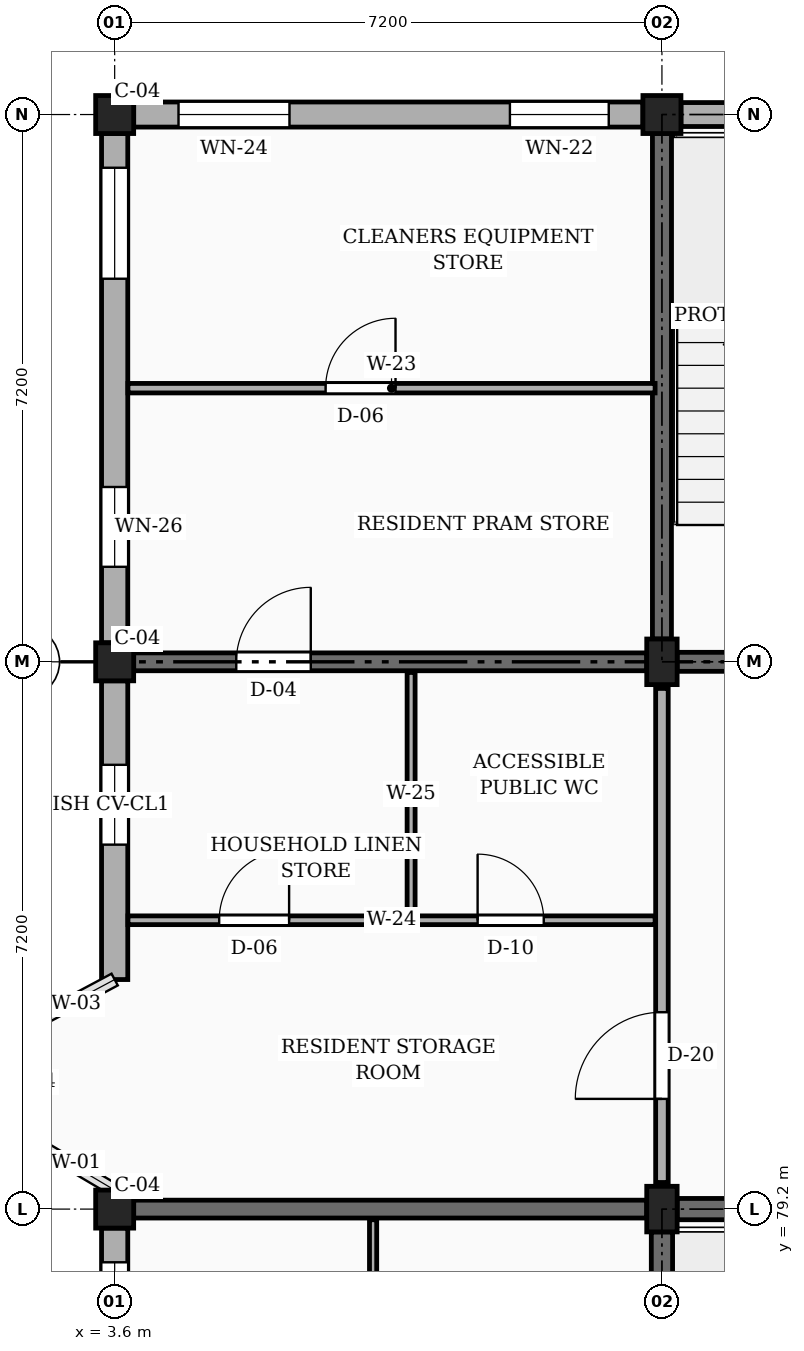
"""IFC4 building model, lengths in metres.
Left out: names, types, materials, properties, quantities, classifications, styles, units other than length and angle.
Written with IfcOpenShell. Run it as: python <this file> out.ifc"""

import sys

from ifc_helpers import new_model, si_unit, direction, frame, frame_2d, origin, origin_2d, place, context, subcontext, project, spatial, rectangle, extrude, element, fill, save


model = new_model("IFC4")
c1 = context("Model", 3, precision=1e-05, world=origin(), true_north=direction((0.0, 1.0)))
c2 = subcontext(c1, "Body", "Model", "MODEL_VIEW")
j1 = project(units=[si_unit("LENGTHUNIT", "METRE"), si_unit("PLANEANGLEUNIT", "RADIAN")], contexts=[c1])
p1 = place(None, origin())
s1 = spatial("IfcSite", under=j1, at=p1, CompositionType="ELEMENT")
p2 = place(p1, origin())
s2 = spatial("IfcBuilding", under=s1, at=p2, CompositionType="ELEMENT")
p3 = place(p2, frame((0.0, 0.0, 23.4)))
s3 = spatial("IfcBuildingStorey", under=s2, at=p3, CompositionType="ELEMENT", Elevation=23.4)
for number, where, z_axis, x_axis in (
    (1, (3.6, 79.2, 0.0), (0.0, 0.0, 1.0), (1.0, 0.0, 0.0)),
    (2, (3.6, 86.4, 0.0), (0.0, 0.0, 1.0), (1.0, 0.0, 0.0)),
    (3, (3.6, 93.6, 0.0), (0.0, 0.0, 1.0), (1.0, 0.0, 0.0)),
):
    element("IfcColumn", number, at=place(p3, frame(where, z_axis=z_axis, x_axis=x_axis)), inside=s3, PredefinedType="COLUMN", context=c2, shape_type="SweptSolid", body=[
        extrude(rectangle(XDim=0.5, YDim=0.5, at=origin_2d()), origin(), (0.0, 0.0, 1.0), 3.15),
    ])
for number, where, z_axis, x_axis in (
    (4, (10.8, 79.2, 0.0), (0.0, 0.0, 1.0), (1.0, 0.0, 0.0)),
    (5, (10.8, 86.4, 0.0), (0.0, 0.0, 1.0), (1.0, 0.0, 0.0)),
):
    element("IfcColumn", number, at=place(p3, frame(where, z_axis=z_axis, x_axis=x_axis)), inside=s3, PredefinedType="COLUMN", context=c2, shape_type="SweptSolid", body=[
        extrude(rectangle(XDim=0.4, YDim=0.6, at=origin_2d()), origin(), (0.0, 0.0, 1.0), 3.15),
    ])
p4 = place(p3, frame((10.8, 93.6, 0.0), z_axis=(0.0, 0.0, 1.0), x_axis=(1.0, 0.0, 0.0)))
e6 = element("IfcColumn", 6, at=p4, inside=s3, PredefinedType="COLUMN", context=c2, shape_type="SweptSolid", body=[
    extrude(rectangle(XDim=0.5, YDim=0.5, at=origin_2d()), origin(), (0.0, 0.0, 1.0), 3.15),
])
p5 = place(p3, frame((3.85, 79.2, 0.0), z_axis=(0.0, 0.0, 1.0), x_axis=(1.0, 0.0, 0.0)))
e7 = element("IfcWall", 7, at=p5, inside=s3, PredefinedType="SOLIDWALL", context=c2, shape_type="SweptSolid", body=[
    extrude(rectangle(XDim=6.75, YDim=0.235, at=frame_2d((3.375, 0.0))), origin(), (0.0, 0.0, 1.0), 2.21),
])
p6 = place(p3, frame((3.85, 86.4, 0.0), z_axis=(0.0, 0.0, 1.0), x_axis=(1.0, 0.0, 0.0)))
e8 = element("IfcWall", 8, at=p6, inside=s3, PredefinedType="SOLIDWALL", context=c2, shape_type="SweptSolid", body=[
    extrude(rectangle(XDim=6.75, YDim=0.235, at=frame_2d((3.375, 0.0))), origin(), (0.0, 0.0, 1.0), 2.21),
])
p7 = place(p6, frame((1.35, 0.0, 0.0)))
e9 = element("IfcOpeningElement", 9, at=p7, cuts=e8, PredefinedType="OPENING", context=c2, shape_type="SweptSolid", body=[
    extrude(rectangle(XDim=0.98, YDim=2.12, at=frame_2d((0.49, 1.06))), frame((0.0, 0.127, 0.0), z_axis=(0.0, -1.0, 0.0), x_axis=(1.0, 0.0, 0.0)), (0.0, 0.0, 1.0), 0.255),
])
p8 = place(p3, frame((17.75, 93.6, 0.0), z_axis=(0.0, 0.0, 1.0), x_axis=(-1.0, 0.0, 0.0)))
e10 = element("IfcWall", 10, at=p8, inside=s3, PredefinedType="SOLIDWALL", context=c2, shape_type="SweptSolid", body=[
    extrude(rectangle(XDim=6.7, YDim=0.315, at=frame_2d((3.35, 0.0))), origin(), (0.0, 0.0, 1.0), 2.48),
])
p9 = place(p8, frame((2.925, 0.0, 0.9)))
e11 = element("IfcOpeningElement", 11, at=p9, cuts=e10, PredefinedType="OPENING", context=c2, shape_type="SweptSolid", body=[
    extrude(rectangle(XDim=0.85, YDim=1.15, at=frame_2d((0.425, 0.575))), frame((0.0, 0.167, 0.0), z_axis=(0.0, -1.0, 0.0), x_axis=(1.0, 0.0, 0.0)), (0.0, 0.0, 1.0), 0.335),
])
p10 = place(p3, frame((10.55, 93.6, 0.0), z_axis=(0.0, 0.0, 1.0), x_axis=(-1.0, 0.0, 0.0)))
e12 = element("IfcWall", 12, at=p10, inside=s3, PredefinedType="SOLIDWALL", context=c2, shape_type="SweptSolid", body=[
    extrude(rectangle(XDim=6.7, YDim=0.33, at=frame_2d((3.35, 0.0))), origin(), (0.0, 0.0, 1.0), 2.48),
])
p11 = place(p10, frame((0.45, 0.0, 0.78)))
e13 = element("IfcOpeningElement", 13, at=p11, cuts=e12, PredefinedType="OPENING", context=c2, shape_type="SweptSolid", body=[
    extrude(rectangle(XDim=1.3, YDim=1.36, at=frame_2d((0.65, 0.68))), frame((0.0, 0.175, 0.0), z_axis=(0.0, -1.0, 0.0), x_axis=(1.0, 0.0, 0.0)), (0.0, 0.0, 1.0), 0.35),
])
p12 = place(p10, frame((4.65, 0.0, 0.78)))
e14 = element("IfcOpeningElement", 14, at=p12, cuts=e12, PredefinedType="OPENING", context=c2, shape_type="SweptSolid", body=[
    extrude(rectangle(XDim=1.46, YDim=1.36, at=frame_2d((0.73, 0.68))), frame((0.0, 0.175, 0.0), z_axis=(0.0, -1.0, 0.0), x_axis=(1.0, 0.0, 0.0)), (0.0, 0.0, 1.0), 0.35),
])
p13 = place(p3, frame((3.6, 93.35, 0.0), z_axis=(0.0, 0.0, 1.0), x_axis=(0.0, -1.0, 0.0)))
e15 = element("IfcWall", 15, at=p13, inside=s3, PredefinedType="SOLIDWALL", context=c2, shape_type="SweptSolid", body=[
    extrude(rectangle(XDim=6.7, YDim=0.345, at=frame_2d((3.35, 0.0))), origin(), (0.0, 0.0, 1.0), 2.48),
])
p14 = place(p13, frame((0.45, 0.0, 0.78)))
e16 = element("IfcOpeningElement", 16, at=p14, cuts=e15, PredefinedType="OPENING", context=c2, shape_type="SweptSolid", body=[
    extrude(rectangle(XDim=1.46, YDim=1.36, at=frame_2d((0.73, 0.68))), frame((0.0, 0.183, 0.0), z_axis=(0.0, -1.0, 0.0), x_axis=(1.0, 0.0, 0.0)), (0.0, 0.0, 1.0), 0.365),
])
p15 = place(p13, frame((4.65, 0.0, 0.78)))
e17 = element("IfcOpeningElement", 17, at=p15, cuts=e15, PredefinedType="OPENING", context=c2, shape_type="SweptSolid", body=[
    extrude(rectangle(XDim=1.05, YDim=1.44, at=frame_2d((0.525, 0.72))), frame((0.0, 0.183, 0.0), z_axis=(0.0, -1.0, 0.0), x_axis=(1.0, 0.0, 0.0)), (0.0, 0.0, 1.0), 0.365),
])
p16 = place(p3, frame((3.6, 86.15, 0.0), z_axis=(0.0, 0.0, 1.0), x_axis=(0.0, -1.0, 0.0)))
e18 = element("IfcWall", 18, at=p16, inside=s3, PredefinedType="SOLIDWALL", context=c2, shape_type="SweptSolid", body=[
    extrude(rectangle(XDim=3.93, YDim=0.345, at=frame_2d((1.965, 0.0))), origin(), (0.0, 0.0, 1.0), 2.48),
])
p17 = place(p16, frame((1.105, 0.0, 0.78)))
e19 = element("IfcOpeningElement", 19, at=p17, cuts=e18, PredefinedType="OPENING", context=c2, shape_type="SweptSolid", body=[
    extrude(rectangle(XDim=1.05, YDim=1.44, at=frame_2d((0.525, 0.72))), frame((0.0, 0.183, 0.0), z_axis=(0.0, -1.0, 0.0), x_axis=(1.0, 0.0, 0.0)), (0.0, 0.0, 1.0), 0.365),
])
p18 = place(p3, frame((3.6, 78.95, 0.0), z_axis=(0.0, 0.0, 1.0), x_axis=(0.0, -1.0, 0.0)))
e20 = element("IfcWall", 20, at=p18, inside=s3, PredefinedType="SOLIDWALL", context=c2, shape_type="SweptSolid", body=[
    extrude(rectangle(XDim=6.7, YDim=0.345, at=frame_2d((3.35, 0.0))), origin(), (0.0, 0.0, 1.0), 2.48),
])
p19 = place(p18, frame((0.45, 0.0, 0.78)))
e21 = element("IfcOpeningElement", 21, at=p19, cuts=e20, PredefinedType="OPENING", context=c2, shape_type="SweptSolid", body=[
    extrude(rectangle(XDim=1.15, YDim=1.44, at=frame_2d((0.575, 0.72))), frame((0.0, 0.183, 0.0), z_axis=(0.0, -1.0, 0.0), x_axis=(1.0, 0.0, 0.0)), (0.0, 0.0, 1.0), 0.365),
])
p20 = place(p18, frame((4.65, 0.0, 0.78)))
e22 = element("IfcOpeningElement", 22, at=p20, cuts=e20, PredefinedType="OPENING", context=c2, shape_type="SweptSolid", body=[
    extrude(rectangle(XDim=1.35, YDim=1.44, at=frame_2d((0.675, 0.72))), frame((0.0, 0.183, 0.0), z_axis=(0.0, -1.0, 0.0), x_axis=(1.0, 0.0, 0.0)), (0.0, 0.0, 1.0), 0.365),
])
p21 = place(p3, frame((10.8, 72.3, 0.0), z_axis=(0.0, 0.0, 1.0), x_axis=(0.0, 1.0, 0.0)))
e23 = element("IfcWall", 23, at=p21, inside=s3, PredefinedType="SHEAR", context=c2, shape_type="SweptSolid", body=[
    extrude(rectangle(XDim=6.6, YDim=0.28, at=frame_2d((3.3, 0.0))), origin(), (0.0, 0.0, 1.0), 2.91),
])
p22 = place(p3, frame((11.0, 79.2, 0.0), z_axis=(0.0, 0.0, 1.0), x_axis=(1.0, 0.0, 0.0)))
e24 = element("IfcWall", 24, at=p22, inside=s3, PredefinedType="SHEAR", context=c2, shape_type="SweptSolid", body=[
    extrude(rectangle(XDim=6.8, YDim=0.28, at=frame_2d((3.4, 0.0))), origin(), (0.0, 0.0, 1.0), 2.91),
])
p23 = place(p3, frame((10.8, 86.7, 0.0), z_axis=(0.0, 0.0, 1.0), x_axis=(0.0, 1.0, 0.0)))
e25 = element("IfcWall", 25, at=p23, inside=s3, PredefinedType="SHEAR", context=c2, shape_type="SweptSolid", body=[
    extrude(rectangle(XDim=6.65, YDim=0.25, at=frame_2d((3.325, 0.0))), origin(), (0.0, 0.0, 1.0), 2.91),
])
p24 = place(p3, frame((11.0, 86.4, 0.0), z_axis=(0.0, 0.0, 1.0), x_axis=(1.0, 0.0, 0.0)))
e26 = element("IfcWall", 26, at=p24, inside=s3, PredefinedType="SHEAR", context=c2, shape_type="SweptSolid", body=[
    extrude(rectangle(XDim=6.8, YDim=0.25, at=frame_2d((3.4, 0.0))), origin(), (0.0, 0.0, 1.0), 2.91),
])
p25 = place(p3, frame((10.8, 79.55, 0.0), z_axis=(0.0, 0.0, 1.0), x_axis=(0.0, 1.0, 0.0)))
e27 = element("IfcWall", 27, at=p25, inside=s3, PredefinedType="PARTITIONING", context=c2, shape_type="SweptSolid", body=[
    extrude(rectangle(XDim=6.5, YDim=0.165, at=frame_2d((3.25, 0.0))), origin(), (0.0, 0.0, 1.0), 2.345),
])
p26 = place(p25, frame((1.1, 0.0, 0.0)))
e28 = element("IfcOpeningElement", 28, at=p26, cuts=e27, PredefinedType="OPENING", context=c2, shape_type="SweptSolid", body=[
    extrude(rectangle(XDim=1.14, YDim=2.18, at=frame_2d((0.57, 1.09))), frame((0.0, 0.093, 0.0), z_axis=(0.0, -1.0, 0.0), x_axis=(1.0, 0.0, 0.0)), (0.0, 0.0, 1.0), 0.185),
])
p27 = place(p3, frame((7.0, 75.37, 0.0), z_axis=(0.0, 0.0, 1.0), x_axis=(0.0, 1.0, 0.0)))
e29 = element("IfcWall", 29, at=p27, inside=s3, PredefinedType="PARTITIONING", context=c2, shape_type="SweptSolid", body=[
    extrude(rectangle(XDim=3.69, YDim=0.095, at=frame_2d((1.845, 0.0))), origin(), (0.0, 0.0, 1.0), 2.345),
])
p28 = place(p3, frame((3.775, 83.0, 0.0), z_axis=(0.0, 0.0, 1.0), x_axis=(1.0, 0.0, 0.0)))
e30 = element("IfcWall", 30, at=p28, inside=s3, PredefinedType="PARTITIONING", context=c2, shape_type="SweptSolid", body=[
    extrude(rectangle(XDim=6.935, YDim=0.115, at=frame_2d((3.468, 0.0))), origin(), (0.0, 0.0, 1.0), 2.345),
])
p29 = place(p28, frame((4.6, 0.0, 0.0)))
e31 = element("IfcOpeningElement", 31, at=p29, cuts=e30, PredefinedType="OPENING", context=c2, shape_type="SweptSolid", body=[
    extrude(rectangle(XDim=0.87, YDim=2.05, at=frame_2d((0.435, 1.025))), frame((0.0, 0.067, 0.0), z_axis=(0.0, -1.0, 0.0), x_axis=(1.0, 0.0, 0.0)), (0.0, 0.0, 1.0), 0.135),
])
p30 = place(p28, frame((1.2, 0.0, 0.0)))
e32 = element("IfcOpeningElement", 32, at=p30, cuts=e30, PredefinedType="OPENING", context=c2, shape_type="SweptSolid", body=[
    extrude(rectangle(XDim=0.92, YDim=2.1, at=frame_2d((0.46, 1.05))), frame((0.0, 0.067, 0.0), z_axis=(0.0, -1.0, 0.0), x_axis=(1.0, 0.0, 0.0)), (0.0, 0.0, 1.0), 0.135),
])
p31 = place(p3, frame((7.5, 83.07, 0.0), z_axis=(0.0, 0.0, 1.0), x_axis=(0.0, 1.0, 0.0)))
e33 = element("IfcWall", 33, at=p31, inside=s3, PredefinedType="PARTITIONING", context=c2, shape_type="SweptSolid", body=[
    extrude(rectangle(XDim=3.19, YDim=0.105, at=frame_2d((1.595, 0.0))), origin(), (0.0, 0.0, 1.0), 2.345),
])
p32 = place(p3, frame((3.775, 90.0, 0.0), z_axis=(0.0, 0.0, 1.0), x_axis=(1.0, 0.0, 0.0)))
e34 = element("IfcWall", 34, at=p32, inside=s3, PredefinedType="PARTITIONING", context=c2, shape_type="SweptSolid", body=[
    extrude(rectangle(XDim=6.935, YDim=0.125, at=frame_2d((3.468, 0.0))), origin(), (0.0, 0.0, 1.0), 2.345),
])
p33 = place(p32, frame((2.6, 0.0, 0.0)))
e35 = element("IfcOpeningElement", 35, at=p33, cuts=e34, PredefinedType="OPENING", context=c2, shape_type="SweptSolid", body=[
    extrude(rectangle(XDim=0.92, YDim=2.1, at=frame_2d((0.46, 1.05))), frame((0.0, 0.073, 0.0), z_axis=(0.0, -1.0, 0.0), x_axis=(1.0, 0.0, 0.0)), (0.0, 0.0, 1.0), 0.145),
])
p34 = place(p11, origin())
e36 = element("IfcWindow", 36, at=p34, inside=s3, PartitioningType="SINGLE_PANEL", PredefinedType="WINDOW", context=c2, shape_type="SweptSolid", body=[
    extrude(rectangle(XDim=1.3, YDim=1.36, at=frame_2d((0.65, 0.68))), frame((0.0, 0.03, 0.0), z_axis=(0.0, -1.0, 0.0), x_axis=(1.0, 0.0, 0.0)), (0.0, 0.0, 1.0), 0.06),
])
fill(e13, e36)
p35 = place(p12, origin())
e37 = element("IfcWindow", 37, at=p35, inside=s3, PartitioningType="SINGLE_PANEL", PredefinedType="WINDOW", context=c2, shape_type="SweptSolid", body=[
    extrude(rectangle(XDim=1.46, YDim=1.36, at=frame_2d((0.73, 0.68))), frame((0.0, 0.03, 0.0), z_axis=(0.0, -1.0, 0.0), x_axis=(1.0, 0.0, 0.0)), (0.0, 0.0, 1.0), 0.06),
])
fill(e14, e37)
p36 = place(p14, origin())
e38 = element("IfcWindow", 38, at=p36, inside=s3, PartitioningType="SINGLE_PANEL", PredefinedType="WINDOW", context=c2, shape_type="SweptSolid", body=[
    extrude(rectangle(XDim=1.46, YDim=1.36, at=frame_2d((0.73, 0.68))), frame((0.0, 0.03, 0.0), z_axis=(0.0, -1.0, 0.0), x_axis=(1.0, 0.0, 0.0)), (0.0, 0.0, 1.0), 0.06),
])
fill(e16, e38)
p37 = place(p15, origin())
e39 = element("IfcWindow", 39, at=p37, inside=s3, PartitioningType="SINGLE_PANEL", PredefinedType="WINDOW", context=c2, shape_type="SweptSolid", body=[
    extrude(rectangle(XDim=1.05, YDim=1.44, at=frame_2d((0.525, 0.72))), frame((0.0, 0.03, 0.0), z_axis=(0.0, -1.0, 0.0), x_axis=(1.0, 0.0, 0.0)), (0.0, 0.0, 1.0), 0.06),
])
fill(e17, e39)
p38 = place(p17, origin())
e40 = element("IfcWindow", 40, at=p38, inside=s3, PartitioningType="SINGLE_PANEL", PredefinedType="WINDOW", context=c2, shape_type="SweptSolid", body=[
    extrude(rectangle(XDim=1.05, YDim=1.44, at=frame_2d((0.525, 0.72))), frame((0.0, 0.03, 0.0), z_axis=(0.0, -1.0, 0.0), x_axis=(1.0, 0.0, 0.0)), (0.0, 0.0, 1.0), 0.06),
])
fill(e19, e40)
p39 = place(p19, origin())
e41 = element("IfcWindow", 41, at=p39, inside=s3, PartitioningType="SINGLE_PANEL", PredefinedType="WINDOW", context=c2, shape_type="SweptSolid", body=[
    extrude(rectangle(XDim=1.15, YDim=1.44, at=frame_2d((0.575, 0.72))), frame((0.0, 0.03, 0.0), z_axis=(0.0, -1.0, 0.0), x_axis=(1.0, 0.0, 0.0)), (0.0, 0.0, 1.0), 0.06),
])
fill(e21, e41)
p40 = place(p26, origin())
e42 = element("IfcDoor", 42, at=p40, inside=s3, OperationType="SINGLE_SWING_LEFT", PredefinedType="DOOR", context=c2, shape_type="SweptSolid", body=[
    extrude(rectangle(XDim=1.14, YDim=2.18, at=frame_2d((0.57, 1.09))), frame((0.0, 0.025, 0.0), z_axis=(0.0, -1.0, 0.0), x_axis=(1.0, 0.0, 0.0)), (0.0, 0.0, 1.0), 0.05),
])
fill(e28, e42)
p41 = place(p29, origin())
e43 = element("IfcDoor", 43, at=p41, inside=s3, OperationType="SINGLE_SWING_LEFT", PredefinedType="DOOR", context=c2, shape_type="SweptSolid", body=[
    extrude(rectangle(XDim=0.87, YDim=2.05, at=frame_2d((0.435, 1.025))), frame((0.0, 0.025, 0.0), z_axis=(0.0, -1.0, 0.0), x_axis=(1.0, 0.0, 0.0)), (0.0, 0.0, 1.0), 0.05),
])
fill(e31, e43)
p42 = place(p30, origin())
e44 = element("IfcDoor", 44, at=p42, inside=s3, OperationType="SINGLE_SWING_RIGHT", PredefinedType="DOOR", context=c2, shape_type="SweptSolid", body=[
    extrude(rectangle(XDim=0.92, YDim=2.1, at=frame_2d((0.46, 1.05))), frame((0.0, 0.025, 0.0), z_axis=(0.0, -1.0, 0.0), x_axis=(1.0, 0.0, 0.0)), (0.0, 0.0, 1.0), 0.05),
])
fill(e32, e44)
p43 = place(p33, origin())
e45 = element("IfcDoor", 45, at=p43, inside=s3, OperationType="SINGLE_SWING_RIGHT", PredefinedType="DOOR", context=c2, shape_type="SweptSolid", body=[
    extrude(rectangle(XDim=0.92, YDim=2.1, at=frame_2d((0.46, 1.05))), frame((0.0, 0.025, 0.0), z_axis=(0.0, -1.0, 0.0), x_axis=(1.0, 0.0, 0.0)), (0.0, 0.0, 1.0), 0.05),
])
fill(e35, e45)
p44 = place(p7, origin())
e46 = element("IfcDoor", 46, at=p44, inside=s3, OperationType="SINGLE_SWING_RIGHT", PredefinedType="DOOR", context=c2, shape_type="SweptSolid", body=[
    extrude(rectangle(XDim=0.98, YDim=2.12, at=frame_2d((0.49, 1.06))), frame((0.0, 0.025, 0.0), z_axis=(0.0, -1.0, 0.0), x_axis=(1.0, 0.0, 0.0)), (0.0, 0.0, 1.0), 0.05),
])
fill(e9, e46)
save(model, sys.argv[1])
